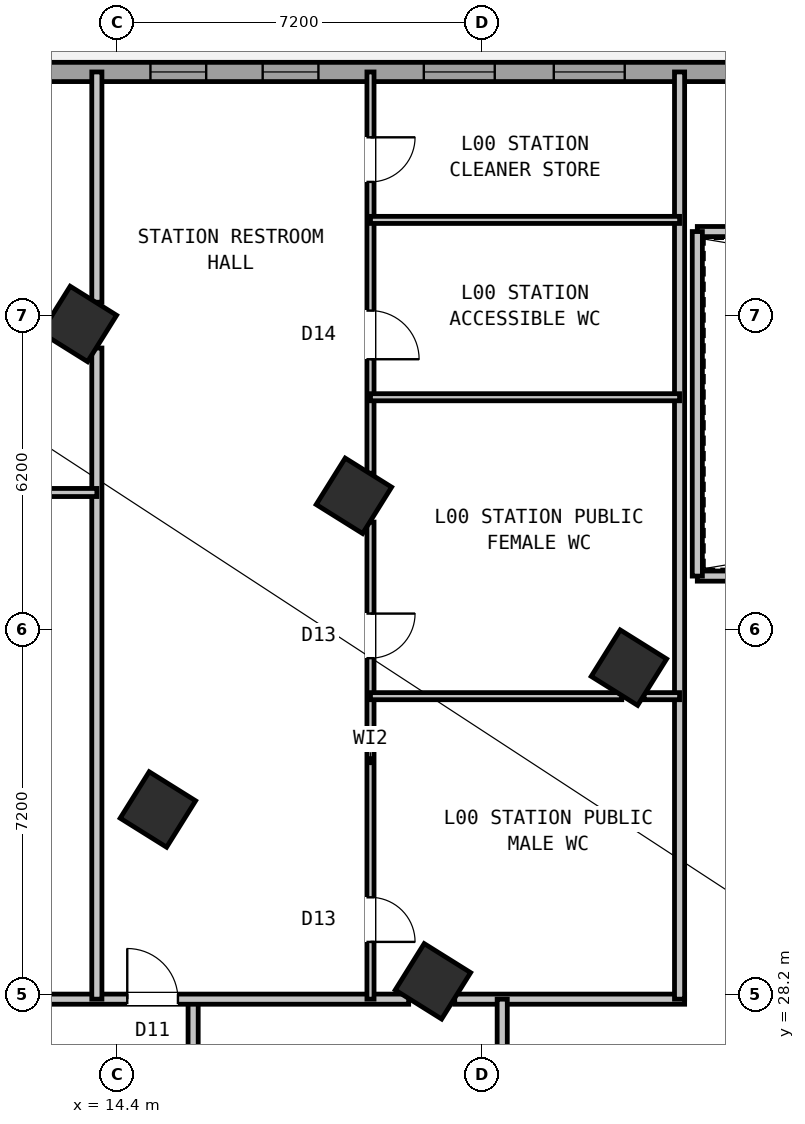
"""IFC4 building model, lengths in metres.
Left out: names, types, materials, properties, quantities, classifications, styles, units other than length and angle.
Written with IfcOpenShell. Run it as: python <this file> out.ifc"""

import sys

from ifc_helpers import new_model, si_unit, direction, frame, frame_2d, origin, origin_2d, place, context, subcontext, project, spatial, rectangle, hollow_rectangle, extrude, source, transform, mapped, element, fill, save


model = new_model("IFC4")
c1 = context("Model", 3, precision=1e-05, world=origin(), true_north=direction((0.0, 1.0)))
c2 = subcontext(c1, "Body", "Model", "MODEL_VIEW")
j1 = project(units=[si_unit("LENGTHUNIT", "METRE"), si_unit("PLANEANGLEUNIT", "RADIAN")], contexts=[c1])
p1 = place(None, origin())
s1 = spatial("IfcSite", under=j1, at=p1, CompositionType="ELEMENT")
p2 = place(p1, origin())
s2 = spatial("IfcBuilding", under=s1, at=p2, CompositionType="ELEMENT")
p3 = place(p2, origin())
s3 = spatial("IfcBuildingStorey", under=s2, at=p3, CompositionType="ELEMENT", Elevation=0.0)
m1 = source(origin(), c2, "Body", "SweptSolid", [
    extrude(hollow_rectangle(XDim=1.08, YDim=1.08, WallThickness=0.04, at=origin_2d()), origin(), (0.0, 0.0, 1.0), 5.4),
])
for number, where, z_axis, x_axis in (
    (1, (24.5, 34.643, 0.0), (0.0, 0.0, 1.0), (-0.848, 0.53, 0.0)),
    (2, (20.632, 28.452, 0.0), (0.0, 0.0, 1.0), (-0.848, 0.53, 0.0)),
    (3, (19.073, 38.034, 0.0), (0.0, 0.0, 1.0), (-0.848, 0.53, 0.0)),
    (4, (15.205, 31.844, 0.0), (0.0, 0.0, 1.0), (-0.848, 0.53, 0.0)),
    (5, (13.646, 41.426, 0.0), (0.0, 0.0, 1.0), (-0.848, 0.53, 0.0)),
):
    element("IfcColumn", number, at=place(p3, frame(where, z_axis=z_axis, x_axis=x_axis)), inside=s3, PredefinedType="COLUMN", context=c2, shape_type="MappedRepresentation", body=[
        mapped(m1, transform((0.0, 0.0, 0.0), scale=1.0)),
    ])
p4 = place(p3, frame((4.883, 46.4, 0.0), z_axis=(0.0, 0.0, 1.0), x_axis=(1.0, 0.0, 0.0)))
e6 = element("IfcWall", 6, at=p4, inside=s3, PredefinedType="STANDARD", context=c2, shape_type="SweptSolid", body=[
    extrude(rectangle(XDim=62.234, YDim=0.38, at=frame_2d((31.117, 0.0))), origin(), (0.0, 0.0, 1.0), 5.05),
])
p5 = place(p4, frame((1.542, 0.0, 0.85)))
e7 = element("IfcOpeningElement", 7, at=p5, cuts=e6, PredefinedType="OPENING", context=c2, shape_type="SweptSolid", body=[
    extrude(rectangle(XDim=2.2, YDim=1.75, at=frame_2d((1.1, 0.875))), frame((0.0, 0.2, 0.0), z_axis=(0.0, -1.0, 0.0), x_axis=(1.0, 0.0, 0.0)), (0.0, 0.0, 1.0), 0.4),
])
p6 = place(p4, frame((5.525, 0.0, 0.85)))
e8 = element("IfcOpeningElement", 8, at=p6, cuts=e6, PredefinedType="OPENING", context=c2, shape_type="SweptSolid", body=[
    extrude(rectangle(XDim=2.2, YDim=1.75, at=frame_2d((1.1, 0.875))), frame((0.0, 0.2, 0.0), z_axis=(0.0, -1.0, 0.0), x_axis=(1.0, 0.0, 0.0)), (0.0, 0.0, 1.0), 0.4),
])
p7 = place(p4, frame((10.175, 0.0, 1.0)))
e9 = element("IfcOpeningElement", 9, at=p7, cuts=e6, PredefinedType="OPENING", context=c2, shape_type="SweptSolid", body=[
    extrude(rectangle(XDim=1.1, YDim=1.35, at=frame_2d((0.55, 0.675))), frame((0.0, 0.2, 0.0), z_axis=(0.0, -1.0, 0.0), x_axis=(1.0, 0.0, 0.0)), (0.0, 0.0, 1.0), 0.4),
])
p8 = place(p4, frame((12.39, 0.0, 1.0)))
e10 = element("IfcOpeningElement", 10, at=p8, cuts=e6, PredefinedType="OPENING", context=c2, shape_type="SweptSolid", body=[
    extrude(rectangle(XDim=1.1, YDim=1.35, at=frame_2d((0.55, 0.675))), frame((0.0, 0.2, 0.0), z_axis=(0.0, -1.0, 0.0), x_axis=(1.0, 0.0, 0.0)), (0.0, 0.0, 1.0), 0.4),
])
p9 = place(p4, frame((15.57, 0.0, 0.95)))
e11 = element("IfcOpeningElement", 11, at=p9, cuts=e6, PredefinedType="OPENING", context=c2, shape_type="SweptSolid", body=[
    extrude(rectangle(XDim=1.4, YDim=1.5, at=frame_2d((0.7, 0.75))), frame((0.0, 0.2, 0.0), z_axis=(0.0, -1.0, 0.0), x_axis=(1.0, 0.0, 0.0)), (0.0, 0.0, 1.0), 0.4),
])
p10 = place(p4, frame((18.135, 0.0, 0.95)))
e12 = element("IfcOpeningElement", 12, at=p10, cuts=e6, PredefinedType="OPENING", context=c2, shape_type="SweptSolid", body=[
    extrude(rectangle(XDim=1.4, YDim=1.5, at=frame_2d((0.7, 0.75))), frame((0.0, 0.2, 0.0), z_axis=(0.0, -1.0, 0.0), x_axis=(1.0, 0.0, 0.0)), (0.0, 0.0, 1.0), 0.4),
])
p11 = place(p4, frame((21.857, 0.0, 0.85)))
e13 = element("IfcOpeningElement", 13, at=p11, cuts=e6, PredefinedType="OPENING", context=c2, shape_type="SweptSolid", body=[
    extrude(rectangle(XDim=2.2, YDim=1.75, at=frame_2d((1.1, 0.875))), frame((0.0, 0.2, 0.0), z_axis=(0.0, -1.0, 0.0), x_axis=(1.0, 0.0, 0.0)), (0.0, 0.0, 1.0), 0.4),
])
p12 = place(p4, frame((25.535, 0.0, 0.85)))
e14 = element("IfcOpeningElement", 14, at=p12, cuts=e6, PredefinedType="OPENING", context=c2, shape_type="SweptSolid", body=[
    extrude(rectangle(XDim=2.2, YDim=1.75, at=frame_2d((1.1, 0.875))), frame((0.0, 0.2, 0.0), z_axis=(0.0, -1.0, 0.0), x_axis=(1.0, 0.0, 0.0)), (0.0, 0.0, 1.0), 0.4),
])
p13 = place(p4, frame((29.214, 0.0, 0.85)))
e15 = element("IfcOpeningElement", 15, at=p13, cuts=e6, PredefinedType="OPENING", context=c2, shape_type="SweptSolid", body=[
    extrude(rectangle(XDim=2.2, YDim=1.75, at=frame_2d((1.1, 0.875))), frame((0.0, 0.2, 0.0), z_axis=(0.0, -1.0, 0.0), x_axis=(1.0, 0.0, 0.0)), (0.0, 0.0, 1.0), 0.4),
])
p14 = place(p4, frame((32.893, 0.0, 0.85)))
e16 = element("IfcOpeningElement", 16, at=p14, cuts=e6, PredefinedType="OPENING", context=c2, shape_type="SweptSolid", body=[
    extrude(rectangle(XDim=2.2, YDim=1.75, at=frame_2d((1.1, 0.875))), frame((0.0, 0.2, 0.0), z_axis=(0.0, -1.0, 0.0), x_axis=(1.0, 0.0, 0.0)), (0.0, 0.0, 1.0), 0.4),
])
p15 = place(p4, frame((36.572, 0.0, 0.85)))
e17 = element("IfcOpeningElement", 17, at=p15, cuts=e6, PredefinedType="OPENING", context=c2, shape_type="SweptSolid", body=[
    extrude(rectangle(XDim=2.2, YDim=1.75, at=frame_2d((1.1, 0.875))), frame((0.0, 0.2, 0.0), z_axis=(0.0, -1.0, 0.0), x_axis=(1.0, 0.0, 0.0)), (0.0, 0.0, 1.0), 0.4),
])
p16 = place(p4, frame((40.251, 0.0, 0.85)))
e18 = element("IfcOpeningElement", 18, at=p16, cuts=e6, PredefinedType="OPENING", context=c2, shape_type="SweptSolid", body=[
    extrude(rectangle(XDim=2.2, YDim=1.75, at=frame_2d((1.1, 0.875))), frame((0.0, 0.2, 0.0), z_axis=(0.0, -1.0, 0.0), x_axis=(1.0, 0.0, 0.0)), (0.0, 0.0, 1.0), 0.4),
])
p17 = place(p4, frame((43.93, 0.0, 0.85)))
e19 = element("IfcOpeningElement", 19, at=p17, cuts=e6, PredefinedType="OPENING", context=c2, shape_type="SweptSolid", body=[
    extrude(rectangle(XDim=2.2, YDim=1.75, at=frame_2d((1.1, 0.875))), frame((0.0, 0.2, 0.0), z_axis=(0.0, -1.0, 0.0), x_axis=(1.0, 0.0, 0.0)), (0.0, 0.0, 1.0), 0.4),
])
p18 = place(p4, frame((47.608, 0.0, 0.85)))
e20 = element("IfcOpeningElement", 20, at=p18, cuts=e6, PredefinedType="OPENING", context=c2, shape_type="SweptSolid", body=[
    extrude(rectangle(XDim=2.2, YDim=1.75, at=frame_2d((1.1, 0.875))), frame((0.0, 0.2, 0.0), z_axis=(0.0, -1.0, 0.0), x_axis=(1.0, 0.0, 0.0)), (0.0, 0.0, 1.0), 0.4),
])
p19 = place(p4, frame((51.287, 0.0, 0.85)))
e21 = element("IfcOpeningElement", 21, at=p19, cuts=e6, PredefinedType="OPENING", context=c2, shape_type="SweptSolid", body=[
    extrude(rectangle(XDim=2.2, YDim=1.75, at=frame_2d((1.1, 0.875))), frame((0.0, 0.2, 0.0), z_axis=(0.0, -1.0, 0.0), x_axis=(1.0, 0.0, 0.0)), (0.0, 0.0, 1.0), 0.4),
])
p20 = place(p4, frame((54.966, 0.0, 0.85)))
e22 = element("IfcOpeningElement", 22, at=p20, cuts=e6, PredefinedType="OPENING", context=c2, shape_type="SweptSolid", body=[
    extrude(rectangle(XDim=2.2, YDim=1.75, at=frame_2d((1.1, 0.875))), frame((0.0, 0.2, 0.0), z_axis=(0.0, -1.0, 0.0), x_axis=(1.0, 0.0, 0.0)), (0.0, 0.0, 1.0), 0.4),
])
p21 = place(p4, frame((58.645, 0.0, 0.85)))
e23 = element("IfcOpeningElement", 23, at=p21, cuts=e6, PredefinedType="OPENING", context=c2, shape_type="SweptSolid", body=[
    extrude(rectangle(XDim=2.2, YDim=1.75, at=frame_2d((1.1, 0.875))), frame((0.0, 0.2, 0.0), z_axis=(0.0, -1.0, 0.0), x_axis=(1.0, 0.0, 0.0)), (0.0, 0.0, 1.0), 0.4),
])
p22 = place(p3, frame((15.9, 16.3, 0.0), z_axis=(0.0, 0.0, 1.0), x_axis=(0.0, 1.0, 0.0)))
e24 = element("IfcWall", 24, at=p22, inside=s3, PredefinedType="STANDARD", context=c2, shape_type="SweptSolid", body=[
    extrude(rectangle(XDim=11.8, YDim=0.2, at=frame_2d((5.9, 0.0))), origin(), (0.0, 0.0, 1.0), 5.04),
])
p23 = place(p22, frame((1.6, 0.0, 0.0)))
e25 = element("IfcOpeningElement", 25, at=p23, cuts=e24, PredefinedType="OPENING", context=c2, shape_type="SweptSolid", body=[
    extrude(rectangle(XDim=1.15, YDim=2.1, at=frame_2d((0.575, 1.05))), frame((0.0, 0.11, 0.0), z_axis=(0.0, -1.0, 0.0), x_axis=(1.0, 0.0, 0.0)), (0.0, 0.0, 1.0), 0.22),
])
p24 = place(p22, frame((7.0, 0.0, 0.0)))
e26 = element("IfcOpeningElement", 26, at=p24, cuts=e24, PredefinedType="OPENING", context=c2, shape_type="SweptSolid", body=[
    extrude(rectangle(XDim=1.4, YDim=2.15, at=frame_2d((0.7, 1.075))), frame((0.0, 0.11, 0.0), z_axis=(0.0, -1.0, 0.0), x_axis=(1.0, 0.0, 0.0)), (0.0, 0.0, 1.0), 0.22),
])
p25 = place(p3, frame((1.6, 28.1, 0.0), z_axis=(0.0, 0.0, 1.0), x_axis=(1.0, 0.0, 0.0)))
e27 = element("IfcWall", 27, at=p25, inside=s3, PredefinedType="STANDARD", context=c2, shape_type="SweptSolid", body=[
    extrude(rectangle(XDim=18.554, YDim=0.2, at=frame_2d((9.277, 0.0))), origin(), (0.0, 0.0, 1.0), 5.04),
])
p26 = place(p25, frame((5.2, 0.0, 0.0)))
e28 = element("IfcOpeningElement", 28, at=p26, cuts=e27, PredefinedType="OPENING", context=c2, shape_type="SweptSolid", body=[
    extrude(rectangle(XDim=1.7, YDim=2.2, at=frame_2d((0.85, 1.1))), frame((0.0, 0.11, 0.0), z_axis=(0.0, -1.0, 0.0), x_axis=(1.0, 0.0, 0.0)), (0.0, 0.0, 1.0), 0.22),
])
p27 = place(p25, frame((13.0, 0.0, 0.0)))
e29 = element("IfcOpeningElement", 29, at=p27, cuts=e27, PredefinedType="OPENING", context=c2, shape_type="SweptSolid", body=[
    extrude(rectangle(XDim=1.0, YDim=2.1, at=frame_2d((0.5, 1.05))), frame((0.0, 0.11, 0.0), z_axis=(0.0, -1.0, 0.0), x_axis=(1.0, 0.0, 0.0)), (0.0, 0.0, 1.0), 0.22),
])
p28 = place(p3, frame((21.063, 28.1, 0.0), z_axis=(0.0, 0.0, 1.0), x_axis=(1.0, 0.0, 0.0)))
e30 = element("IfcWall", 30, at=p28, inside=s3, PredefinedType="STANDARD", context=c2, shape_type="SweptSolid", body=[
    extrude(rectangle(XDim=4.537, YDim=0.2, at=frame_2d((2.269, 0.0))), origin(), (0.0, 0.0, 1.0), 5.04),
])
p29 = place(p3, frame((22.0, 19.53, 0.0), z_axis=(0.0, 0.0, 1.0), x_axis=(0.0, 1.0, 0.0)))
e31 = element("IfcWall", 31, at=p29, inside=s3, PredefinedType="STANDARD", context=c2, shape_type="SweptSolid", body=[
    extrude(rectangle(XDim=8.57, YDim=0.2, at=frame_2d((4.285, 0.0))), origin(), (0.0, 0.0, 1.0), 5.04),
])
p30 = place(p3, frame((14.0, 28.1, 0.0), z_axis=(0.0, 0.0, 1.0), x_axis=(0.0, 1.0, 0.0)))
e32 = element("IfcWall", 32, at=p30, inside=s3, PredefinedType="STANDARD", context=c2, shape_type="SweptSolid", body=[
    extrude(rectangle(XDim=12.852, YDim=0.2, at=frame_2d((6.426, 0.0))), origin(), (0.0, 0.0, 1.0), 5.04),
])
p31 = place(p3, frame((14.0, 41.855, 0.0), z_axis=(0.0, 0.0, 1.0), x_axis=(0.0, 1.0, 0.0)))
e33 = element("IfcWall", 33, at=p31, inside=s3, PredefinedType="STANDARD", context=c2, shape_type="SweptSolid", body=[
    extrude(rectangle(XDim=4.545, YDim=0.2, at=frame_2d((2.272, 0.0))), origin(), (0.0, 0.0, 1.0), 5.04),
])
p32 = place(p3, frame((1.6, 38.1, 0.0), z_axis=(0.0, 0.0, 1.0), x_axis=(1.0, 0.0, 0.0)))
e34 = element("IfcWall", 34, at=p32, inside=s3, PredefinedType="PARTITIONING", context=c2, shape_type="SweptSolid", body=[
    extrude(rectangle(XDim=12.4, YDim=0.16, at=frame_2d((6.2, 0.0))), origin(), (0.0, 0.0, 1.0), 5.04),
])
p33 = place(p32, frame((5.2, 0.0, 0.0)))
e35 = element("IfcOpeningElement", 35, at=p33, cuts=e34, PredefinedType="OPENING", context=c2, shape_type="SweptSolid", body=[
    extrude(rectangle(XDim=1.7, YDim=2.2, at=frame_2d((0.85, 1.1))), frame((0.0, 0.09, 0.0), z_axis=(0.0, -1.0, 0.0), x_axis=(1.0, 0.0, 0.0)), (0.0, 0.0, 1.0), 0.18),
])
p34 = place(p3, frame((25.5, 28.1, 0.0), z_axis=(0.0, 0.0, 1.0), x_axis=(0.0, 1.0, 0.0)))
e36 = element("IfcWall", 36, at=p34, inside=s3, PredefinedType="STANDARD", context=c2, shape_type="SweptSolid", body=[
    extrude(rectangle(XDim=18.3, YDim=0.2, at=frame_2d((9.15, 0.0))), origin(), (0.0, 0.0, 1.0), 5.04),
])
p35 = place(p3, frame((19.4, 28.1, 0.0), z_axis=(0.0, 0.0, 1.0), x_axis=(0.0, 1.0, 0.0)))
e37 = element("IfcWall", 37, at=p35, inside=s3, PredefinedType="PLUMBINGWALL", context=c2, shape_type="SweptSolid", body=[
    extrude(rectangle(XDim=9.416, YDim=0.14, at=frame_2d((4.708, 0.0))), origin(), (0.0, 0.0, 1.0), 5.04),
])
p36 = place(p35, frame((1.13, 0.0, 0.0)))
e38 = element("IfcOpeningElement", 38, at=p36, cuts=e37, PredefinedType="OPENING", context=c2, shape_type="SweptSolid", body=[
    extrude(rectangle(XDim=0.88, YDim=2.08, at=frame_2d((0.44, 1.04))), frame((0.0, 0.08, 0.0), z_axis=(0.0, -1.0, 0.0), x_axis=(1.0, 0.0, 0.0)), (0.0, 0.0, 1.0), 0.16),
])
p37 = place(p35, frame((6.73, 0.0, 0.0)))
e39 = element("IfcOpeningElement", 39, at=p37, cuts=e37, PredefinedType="OPENING", context=c2, shape_type="SweptSolid", body=[
    extrude(rectangle(XDim=0.88, YDim=2.08, at=frame_2d((0.44, 1.04))), frame((0.0, 0.08, 0.0), z_axis=(0.0, -1.0, 0.0), x_axis=(1.0, 0.0, 0.0)), (0.0, 0.0, 1.0), 0.16),
])
p38 = place(p3, frame((19.4, 38.481, 0.0), z_axis=(0.0, 0.0, 1.0), x_axis=(0.0, 1.0, 0.0)))
e40 = element("IfcWall", 40, at=p38, inside=s3, PredefinedType="PLUMBINGWALL", context=c2, shape_type="SweptSolid", body=[
    extrude(rectangle(XDim=7.919, YDim=0.14, at=frame_2d((3.959, 0.0))), origin(), (0.0, 0.0, 1.0), 5.04),
])
p39 = place(p38, frame((2.249, 0.0, 0.0)))
e41 = element("IfcOpeningElement", 41, at=p39, cuts=e40, PredefinedType="OPENING", context=c2, shape_type="SweptSolid", body=[
    extrude(rectangle(XDim=0.96, YDim=2.08, at=frame_2d((0.48, 1.04))), frame((0.0, 0.08, 0.0), z_axis=(0.0, -1.0, 0.0), x_axis=(1.0, 0.0, 0.0)), (0.0, 0.0, 1.0), 0.16),
])
p40 = place(p38, frame((5.749, 0.0, 0.0)))
e42 = element("IfcOpeningElement", 42, at=p40, cuts=e40, PredefinedType="OPENING", context=c2, shape_type="SweptSolid", body=[
    extrude(rectangle(XDim=0.88, YDim=2.08, at=frame_2d((0.44, 1.04))), frame((0.0, 0.08, 0.0), z_axis=(0.0, -1.0, 0.0), x_axis=(1.0, 0.0, 0.0)), (0.0, 0.0, 1.0), 0.16),
])
p41 = place(p3, frame((19.4, 34.08, 0.0), z_axis=(0.0, 0.0, 1.0), x_axis=(1.0, 0.0, 0.0)))
e43 = element("IfcWall", 43, at=p41, inside=s3, PredefinedType="PLUMBINGWALL", context=c2, shape_type="SweptSolid", body=[
    extrude(rectangle(XDim=4.96, YDim=0.14, at=frame_2d((2.48, 0.0))), origin(), (0.0, 0.0, 1.0), 5.04),
])
p42 = place(p3, frame((24.8, 34.08, 0.0), z_axis=(0.0, 0.0, 1.0), x_axis=(1.0, 0.0, 0.0)))
e44 = element("IfcWall", 44, at=p42, inside=s3, PredefinedType="PLUMBINGWALL", context=c2, shape_type="SweptSolid", body=[
    extrude(rectangle(XDim=0.7, YDim=0.14, at=frame_2d((0.35, 0.0))), origin(), (0.0, 0.0, 1.0), 5.04),
])
for number, where, z_axis, x_axis in (
    (45, (19.4, 39.98, 0.0), (0.0, 0.0, 1.0), (1.0, 0.0, 0.0)),
    (46, (19.4, 43.48, 0.0), (0.0, 0.0, 1.0), (1.0, 0.0, 0.0)),
):
    element("IfcWall", number, at=place(p3, frame(where, z_axis=z_axis, x_axis=x_axis)), inside=s3, PredefinedType="PLUMBINGWALL", context=c2, shape_type="SweptSolid", body=[
        extrude(rectangle(XDim=6.1, YDim=0.14, at=frame_2d((3.05, 0.0))), origin(), (0.0, 0.0, 1.0), 5.04),
    ])
p43 = place(p3, frame((25.85, 36.45, 0.0), z_axis=(0.0, 0.0, 1.0), x_axis=(1.0, 0.0, 0.0)))
e47 = element("IfcWall", 47, at=p43, inside=s3, PredefinedType="STANDARD", context=c2, shape_type="SweptSolid", body=[
    extrude(rectangle(XDim=44.55, YDim=0.2, at=frame_2d((22.275, 0.0))), origin(), (0.0, 0.0, 1.0), 5.04),
])
p44 = place(p3, frame((25.85, 43.25, 0.0), z_axis=(0.0, 0.0, 1.0), x_axis=(1.0, 0.0, 0.0)))
e48 = element("IfcWall", 48, at=p44, inside=s3, PredefinedType="STANDARD", context=c2, shape_type="SweptSolid", body=[
    extrude(rectangle(XDim=3.398, YDim=0.2, at=frame_2d((1.699, 0.0))), origin(), (0.0, 0.0, 1.0), 5.04),
])
p45 = place(p3, frame((25.85, 36.45, 0.0), z_axis=(0.0, 0.0, 1.0), x_axis=(0.0, 1.0, 0.0)))
e49 = element("IfcWall", 49, at=p45, inside=s3, PredefinedType="STANDARD", context=c2, shape_type="SweptSolid", body=[
    extrude(rectangle(XDim=6.8, YDim=0.2, at=frame_2d((3.4, 0.0))), origin(), (0.0, 0.0, 1.0), 5.04),
])
m2 = source(origin(), c2, "Body", "SweptSolid", [
    extrude(rectangle(XDim=1.1, YDim=1.35, at=frame_2d((0.55, 0.675))), frame((0.0, 0.03, 0.0), z_axis=(0.0, -1.0, 0.0), x_axis=(1.0, 0.0, 0.0)), (0.0, 0.0, 1.0), 0.06),
])
p46 = place(p7, origin())
e50 = element("IfcWindow", 50, at=p46, inside=s3, PartitioningType="SINGLE_PANEL", PredefinedType="WINDOW", context=c2, shape_type="MappedRepresentation", body=[
    mapped(m2, transform((0.0, 0.0, 0.0), scale=1.0)),
])
fill(e9, e50)
p47 = place(p8, origin())
e51 = element("IfcWindow", 51, at=p47, inside=s3, PartitioningType="SINGLE_PANEL", PredefinedType="WINDOW", context=c2, shape_type="MappedRepresentation", body=[
    mapped(m2, transform((0.0, 0.0, 0.0), scale=1.0)),
])
fill(e10, e51)
m3 = source(origin(), c2, "Body", "SweptSolid", [
    extrude(rectangle(XDim=1.4, YDim=1.5, at=frame_2d((0.7, 0.75))), frame((0.0, 0.03, 0.0), z_axis=(0.0, -1.0, 0.0), x_axis=(1.0, 0.0, 0.0)), (0.0, 0.0, 1.0), 0.06),
])
p48 = place(p9, origin())
e52 = element("IfcWindow", 52, at=p48, inside=s3, PartitioningType="SINGLE_PANEL", PredefinedType="WINDOW", context=c2, shape_type="MappedRepresentation", body=[
    mapped(m3, transform((0.0, 0.0, 0.0), scale=1.0)),
])
fill(e11, e52)
p49 = place(p10, origin())
e53 = element("IfcWindow", 53, at=p49, inside=s3, PartitioningType="SINGLE_PANEL", PredefinedType="WINDOW", context=c2, shape_type="MappedRepresentation", body=[
    mapped(m3, transform((0.0, 0.0, 0.0), scale=1.0)),
])
fill(e12, e53)
m4 = source(origin(), c2, "Body", "SweptSolid", [
    extrude(rectangle(XDim=1.0, YDim=2.1, at=frame_2d((0.5, 1.05))), frame((0.0, 0.025, 0.0), z_axis=(0.0, -1.0, 0.0), x_axis=(1.0, 0.0, 0.0)), (0.0, 0.0, 1.0), 0.05),
])
p50 = place(p27, origin())
e54 = element("IfcDoor", 54, at=p50, inside=s3, OperationType="SINGLE_SWING_LEFT", PredefinedType="DOOR", context=c2, shape_type="MappedRepresentation", body=[
    mapped(m4, transform((0.0, 0.0, 0.0), scale=1.0)),
])
fill(e29, e54)
m5 = source(origin(), c2, "Body", "SweptSolid", [
    extrude(rectangle(XDim=0.88, YDim=2.08, at=frame_2d((0.44, 1.04))), frame((0.0, 0.025, 0.0), z_axis=(0.0, -1.0, 0.0), x_axis=(1.0, 0.0, 0.0)), (0.0, 0.0, 1.0), 0.05),
])
p51 = place(p36, frame((0.88, 0.0, 0.0), z_axis=(0.0, 0.0, 1.0), x_axis=(-1.0, 0.0, 0.0)))
e55 = element("IfcDoor", 55, at=p51, inside=s3, OperationType="SINGLE_SWING_RIGHT", PredefinedType="DOOR", context=c2, shape_type="MappedRepresentation", body=[
    mapped(m5, transform((0.0, 0.0, 0.0), scale=1.0)),
])
fill(e38, e55)
p52 = place(p37, frame((0.88, 0.0, 0.0), z_axis=(0.0, 0.0, 1.0), x_axis=(-1.0, 0.0, 0.0)))
e56 = element("IfcDoor", 56, at=p52, inside=s3, OperationType="SINGLE_SWING_LEFT", PredefinedType="DOOR", context=c2, shape_type="MappedRepresentation", body=[
    mapped(m5, transform((0.0, 0.0, 0.0), scale=1.0)),
])
fill(e39, e56)
m6 = source(origin(), c2, "Body", "SweptSolid", [
    extrude(rectangle(XDim=0.96, YDim=2.08, at=frame_2d((0.48, 1.04))), frame((0.0, 0.025, 0.0), z_axis=(0.0, -1.0, 0.0), x_axis=(1.0, 0.0, 0.0)), (0.0, 0.0, 1.0), 0.05),
])
p53 = place(p39, frame((0.96, 0.0, 0.0), z_axis=(0.0, 0.0, 1.0), x_axis=(-1.0, 0.0, 0.0)))
e57 = element("IfcDoor", 57, at=p53, inside=s3, OperationType="SINGLE_SWING_RIGHT", PredefinedType="DOOR", context=c2, shape_type="MappedRepresentation", body=[
    mapped(m6, transform((0.0, 0.0, 0.0), scale=1.0)),
])
fill(e41, e57)
p54 = place(p40, frame((0.88, 0.0, 0.0), z_axis=(0.0, 0.0, 1.0), x_axis=(-1.0, 0.0, 0.0)))
e58 = element("IfcDoor", 58, at=p54, inside=s3, OperationType="SINGLE_SWING_LEFT", PredefinedType="DOOR", context=c2, shape_type="MappedRepresentation", body=[
    mapped(m5, transform((0.0, 0.0, 0.0), scale=1.0)),
])
fill(e42, e58)
save(model, sys.argv[1])
